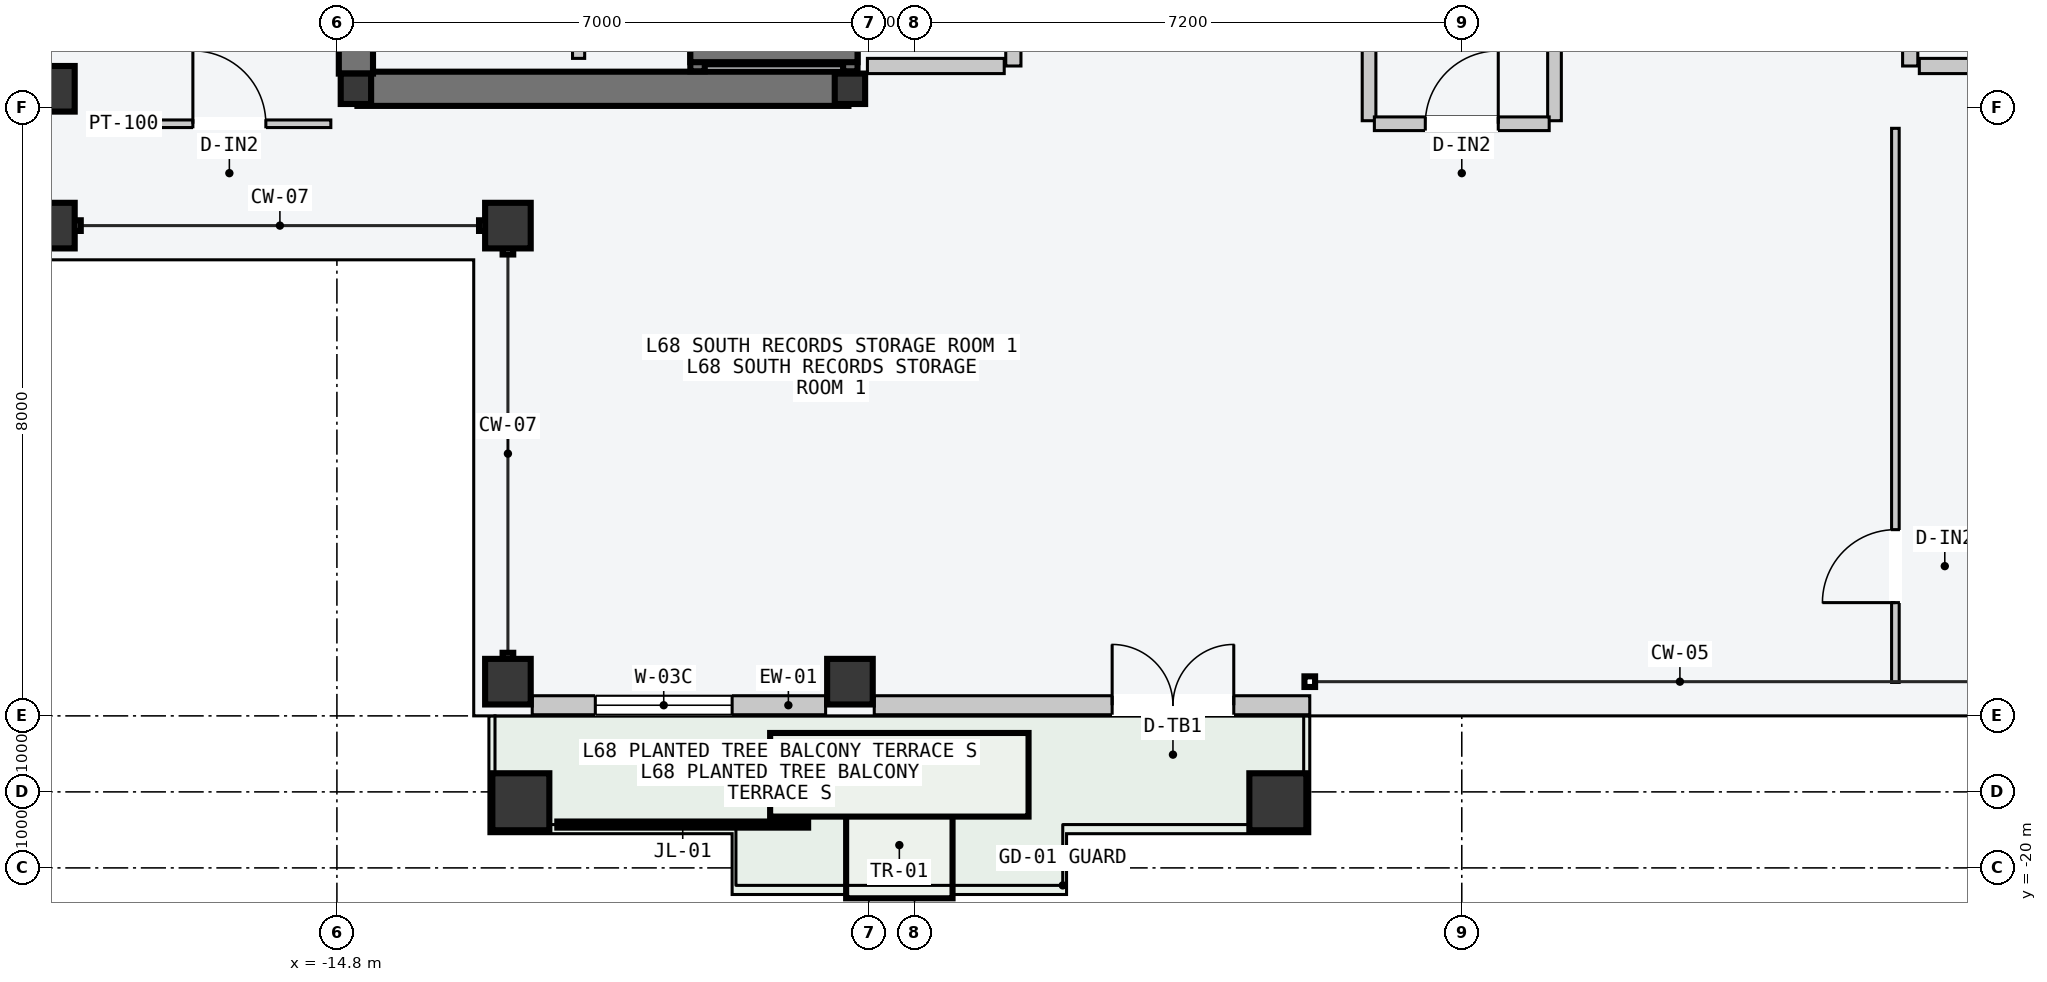
"""IFC4 building model, lengths in metres.
Left out: names, types, materials, properties, quantities, classifications, styles, units other than length and angle.
Written with IfcOpenShell. Run it as: python <this file> out.ifc"""

import sys

from ifc_helpers import new_model, si_unit, direction, frame, frame_2d, origin, origin_2d, place, context, subcontext, project, spatial, rectangle, hollow_rectangle, i_section, extrude, element, fill, save


model = new_model("IFC4")
c1 = context("Model", 3, precision=1e-05, world=origin(), true_north=direction((0.0, 1.0)))
c2 = subcontext(c1, "Body", "Model", "MODEL_VIEW")
j1 = project(units=[si_unit("LENGTHUNIT", "METRE"), si_unit("PLANEANGLEUNIT", "RADIAN")], contexts=[c1])
p1 = place(None, origin())
s1 = spatial("IfcSite", under=j1, at=p1, CompositionType="ELEMENT")
p2 = place(p1, origin())
s2 = spatial("IfcBuilding", under=s1, at=p2, CompositionType="ELEMENT")
p3 = place(p2, frame((0.0, 0.0, 258.0)))
s3 = spatial("IfcBuildingStorey", under=s2, at=p3, CompositionType="ELEMENT", Elevation=258.0)
p4 = place(p3, frame((-14.53, -9.75, -0.2), z_axis=(0.0, 0.0, 1.0), x_axis=(1.0, 0.0, 0.0)))
e1 = element("IfcWall", 1, at=p4, inside=s3, PredefinedType="SHEAR", context=c2, shape_type="SweptSolid", body=[
    extrude(rectangle(XDim=6.46, YDim=0.45, at=frame_2d((3.23, 0.0))), origin(), (0.0, 0.0, 1.0), 3.6),
])
p5 = place(p3, frame((-14.55, -9.55, -0.2), z_axis=(0.0, 0.0, 1.0), x_axis=(0.0, 1.0, 0.0)))
e2 = element("IfcWall", 2, at=p5, inside=s3, PredefinedType="SHEAR", context=c2, shape_type="SweptSolid", body=[
    extrude(rectangle(XDim=9.35, YDim=0.45, at=frame_2d((4.675, 0.0))), origin(), (0.0, 0.0, 1.0), 3.6),
])
for number, where, z_axis, x_axis in (
    (3, (-14.55, -9.75, 0.0), (0.0, 0.0, 1.0), (1.0, 0.0, 0.0)),
    (4, (-8.05, -9.75, 0.0), (0.0, 0.0, 1.0), (1.0, 0.0, 0.0)),
):
    element("IfcColumn", number, at=place(p3, frame(where, z_axis=z_axis, x_axis=x_axis)), inside=s3, PredefinedType="COLUMN", context=c2, shape_type="SweptSolid", body=[
        extrude(i_section(OverallWidth=0.4, OverallDepth=0.4, WebThickness=0.013, FlangeThickness=0.021, at=origin_2d()), origin(), (0.0, 0.0, 1.0), 3.6),
    ])
for number, where, z_axis, x_axis in (
    (5, (-12.55, -17.55, 0.0), (0.0, 0.0, 1.0), (1.0, 0.0, 0.0)),
    (6, (-8.05, -17.55, 0.0), (0.0, 0.0, 1.0), (1.0, 0.0, 0.0)),
    (7, (-18.55, -11.55, 0.0), (0.0, 0.0, 1.0), (0.0, 1.0, 0.0)),
    (8, (-18.55, -9.75, 0.0), (0.0, 0.0, 1.0), (0.0, 1.0, 0.0)),
    (9, (-12.55, -11.55, 0.0), (0.0, 0.0, 1.0), (1.0, 0.0, 0.0)),
):
    element("IfcColumn", number, at=place(p3, frame(where, z_axis=z_axis, x_axis=x_axis)), inside=s3, PredefinedType="COLUMN", context=c2, shape_type="SweptSolid", body=[
        extrude(hollow_rectangle(XDim=0.6, YDim=0.6, WallThickness=0.025, at=origin_2d()), origin(), (0.0, 0.0, 1.0), 3.6),
    ])
for number, where, z_axis, x_axis in (
    (10, (-12.38, -19.13, 0.0), (0.0, 0.0, 1.0), (1.0, 0.0, 0.0)),
    (11, (-2.42, -19.13, 0.0), (0.0, 0.0, 1.0), (1.0, 0.0, 0.0)),
):
    element("IfcColumn", number, at=place(p3, frame(where, z_axis=z_axis, x_axis=x_axis)), inside=s3, PredefinedType="COLUMN", context=c2, shape_type="SweptSolid", body=[
        extrude(hollow_rectangle(XDim=0.75, YDim=0.75, WallThickness=0.032, at=origin_2d()), origin(), (0.0, 0.0, 1.0), 3.6),
    ])
p6 = place(p3, frame((-12.23, -17.86, 0.0), z_axis=(0.0, 0.0, 1.0), x_axis=(1.0, 0.0, 0.0)))
e12 = element("IfcWall", 12, at=p6, inside=s3, PredefinedType="STANDARD", context=c2, shape_type="SweptSolid", body=[
    extrude(rectangle(XDim=3.86, YDim=0.25, at=frame_2d((1.93, 0.0))), origin(), (0.0, 0.0, 1.0), 3.4),
])
p7 = place(p6, frame((0.83, 0.0, 0.85)))
e13 = element("IfcOpeningElement", 13, at=p7, cuts=e12, PredefinedType="OPENING", context=c2, shape_type="SweptSolid", body=[
    extrude(rectangle(XDim=1.8, YDim=2.05, at=frame_2d((0.9, 1.025))), frame((0.0, 0.135, 0.0), z_axis=(0.0, -1.0, 0.0), x_axis=(1.0, 0.0, 0.0)), (0.0, 0.0, 1.0), 0.27),
])
p8 = place(p3, frame((-7.73, -17.86, 0.0), z_axis=(0.0, 0.0, 1.0), x_axis=(1.0, 0.0, 0.0)))
e14 = element("IfcWall", 14, at=p8, inside=s3, PredefinedType="STANDARD", context=c2, shape_type="SweptSolid", body=[
    extrude(rectangle(XDim=5.73, YDim=0.25, at=frame_2d((2.865, 0.0))), origin(), (0.0, 0.0, 1.0), 3.4),
])
p9 = place(p8, frame((3.13, 0.0, 0.0)))
e15 = element("IfcOpeningElement", 15, at=p9, cuts=e14, PredefinedType="OPENING", context=c2, shape_type="SweptSolid", body=[
    extrude(rectangle(XDim=1.6, YDim=2.2, at=frame_2d((0.8, 1.1))), frame((0.0, 0.135, 0.0), z_axis=(0.0, -1.0, 0.0), x_axis=(1.0, 0.0, 0.0)), (0.0, 0.0, 1.0), 0.27),
])
p10 = place(p3, frame((-8.045, -9.52, -0.2), z_axis=(0.0, 0.0, 1.0), x_axis=(0.0, 1.0, 0.0)))
e16 = element("IfcWall", 16, at=p10, inside=s3, PredefinedType="SOLIDWALL", context=c2, shape_type="SweptSolid", body=[
    extrude(rectangle(XDim=2.12, YDim=0.19, at=frame_2d((1.06, 0.0))), origin(), (0.0, 0.0, 1.0), 3.6),
])
p11 = place(p10, frame((0.57, 0.0, 0.2)))
e17 = element("IfcOpeningElement", 17, at=p11, cuts=e16, PredefinedType="OPENING", context=c2, shape_type="SweptSolid", body=[
    extrude(rectangle(XDim=1.1, YDim=2.2, at=frame_2d((0.55, 1.1))), frame((0.0, 0.105, 0.0), z_axis=(0.0, -1.0, 0.0), x_axis=(1.0, 0.0, 0.0)), (0.0, 0.0, 1.0), 0.21),
])
p12 = place(p3, frame((-10.055, -9.52, -0.2), z_axis=(0.0, 0.0, 1.0), x_axis=(0.0, 1.0, 0.0)))
e18 = element("IfcWall", 18, at=p12, inside=s3, PredefinedType="SOLIDWALL", context=c2, shape_type="SweptSolid", body=[
    extrude(rectangle(XDim=2.12, YDim=0.19, at=frame_2d((1.06, 0.0))), origin(), (0.0, 0.0, 1.0), 3.6),
])
p13 = place(p3, frame((-10.15, -9.305, -0.2), z_axis=(0.0, 0.0, 1.0), x_axis=(1.0, 0.0, 0.0)))
e19 = element("IfcWall", 19, at=p13, inside=s3, PredefinedType="SOLIDWALL", context=c2, shape_type="SweptSolid", body=[
    extrude(rectangle(XDim=2.2, YDim=0.19, at=frame_2d((1.1, 0.0))), origin(), (0.0, 0.0, 1.0), 3.6),
])
p14 = place(p3, frame((-5.9, -9.45, 0.0), z_axis=(0.0, 0.0, 1.0), x_axis=(0.0, 1.0, 0.0)))
e20 = element("IfcWall", 20, at=p14, inside=s3, PredefinedType="PARTITIONING", context=c2, shape_type="SweptSolid", body=[
    extrude(rectangle(XDim=10.5, YDim=0.2, at=frame_2d((5.25, 0.0))), origin(), (0.0, 0.0, 1.0), 3.4),
])
p15 = place(p14, frame((3.9, 0.0, 0.0)))
e21 = element("IfcOpeningElement", 21, at=p15, cuts=e20, PredefinedType="OPENING", context=c2, shape_type="SweptSolid", body=[
    extrude(rectangle(XDim=1.5, YDim=2.2, at=frame_2d((0.75, 1.1))), frame((0.0, 0.11, 0.0), z_axis=(0.0, -1.0, 0.0), x_axis=(1.0, 0.0, 0.0)), (0.0, 0.0, 1.0), 0.22),
])
p16 = place(p3, frame((-6.02, -9.45, 0.0), z_axis=(0.0, 0.0, 1.0), x_axis=(-1.0, 0.0, 0.0)))
e22 = element("IfcWall", 22, at=p16, inside=s3, PredefinedType="PARTITIONING", context=c2, shape_type="SweptSolid", body=[
    extrude(rectangle(XDim=1.8, YDim=0.2, at=frame_2d((0.9, 0.0))), origin(), (0.0, 0.0, 1.0), 3.4),
])
p17 = place(p3, frame((-11.62, -9.35, 0.0), z_axis=(0.0, 0.0, 1.0), x_axis=(0.0, 1.0, 0.0)))
e23 = element("IfcWall", 23, at=p17, inside=s3, PredefinedType="PARTITIONING", context=c2, shape_type="SweptSolid", body=[
    extrude(rectangle(XDim=3.85, YDim=0.16, at=frame_2d((1.925, 0.0))), origin(), (0.0, 0.0, 1.0), 3.4),
])
p18 = place(p17, frame((0.512, 0.0, 0.0)))
e24 = element("IfcOpeningElement", 24, at=p18, cuts=e23, PredefinedType="OPENING", context=c2, shape_type="SweptSolid", body=[
    extrude(rectangle(XDim=0.9, YDim=2.15, at=frame_2d((0.45, 1.075))), frame((0.0, 0.09, 0.0), z_axis=(0.0, -1.0, 0.0), x_axis=(1.0, 0.0, 0.0)), (0.0, 0.0, 1.0), 0.18),
])
p19 = place(p17, frame((2.438, 0.0, 0.0)))
e25 = element("IfcOpeningElement", 25, at=p19, cuts=e23, PredefinedType="OPENING", context=c2, shape_type="SweptSolid", body=[
    extrude(rectangle(XDim=0.9, YDim=2.15, at=frame_2d((0.45, 1.075))), frame((0.0, 0.09, 0.0), z_axis=(0.0, -1.0, 0.0), x_axis=(1.0, 0.0, 0.0)), (0.0, 0.0, 1.0), 0.18),
])
p20 = place(p3, frame((5.9, -9.45, 0.0), z_axis=(0.0, 0.0, 1.0), x_axis=(0.0, 1.0, 0.0)))
e26 = element("IfcWall", 26, at=p20, inside=s3, PredefinedType="PARTITIONING", context=c2, shape_type="SweptSolid", body=[
    extrude(rectangle(XDim=10.5, YDim=0.2, at=frame_2d((5.25, 0.0))), origin(), (0.0, 0.0, 1.0), 3.4),
])
p21 = place(p20, frame((3.9, 0.0, 0.0)))
e27 = element("IfcOpeningElement", 27, at=p21, cuts=e26, PredefinedType="OPENING", context=c2, shape_type="SweptSolid", body=[
    extrude(rectangle(XDim=1.5, YDim=2.2, at=frame_2d((0.75, 1.1))), frame((0.0, 0.11, 0.0), z_axis=(0.0, -1.0, 0.0), x_axis=(1.0, 0.0, 0.0)), (0.0, 0.0, 1.0), 0.22),
])
p22 = place(p3, frame((6.02, -9.45, 0.0), z_axis=(0.0, 0.0, 1.0), x_axis=(1.0, 0.0, 0.0)))
e28 = element("IfcWall", 28, at=p22, inside=s3, PredefinedType="PARTITIONING", context=c2, shape_type="SweptSolid", body=[
    extrude(rectangle(XDim=1.8, YDim=0.2, at=frame_2d((0.9, 0.0))), origin(), (0.0, 0.0, 1.0), 3.4),
])
p23 = place(p3, frame((-1.22, -10.17, 0.0), z_axis=(0.0, 0.0, 1.0), x_axis=(0.0, 1.0, 0.0)))
e29 = element("IfcWall", 29, at=p23, inside=s3, PredefinedType="PARTITIONING", context=c2, shape_type="SweptSolid", body=[
    extrude(rectangle(XDim=4.49, YDim=0.18, at=frame_2d((2.245, 0.0))), origin(), (0.0, 0.0, 1.0), 3.4),
])
p24 = place(p23, frame((1.15, 0.0, 0.0)))
e30 = element("IfcOpeningElement", 30, at=p24, cuts=e29, PredefinedType="OPENING", context=c2, shape_type="SweptSolid", body=[
    extrude(rectangle(XDim=0.96, YDim=2.18, at=frame_2d((0.48, 1.09))), frame((0.0, 0.1, 0.0), z_axis=(0.0, -1.0, 0.0), x_axis=(1.0, 0.0, 0.0)), (0.0, 0.0, 1.0), 0.2),
])
p25 = place(p3, frame((1.22, -10.17, 0.0), z_axis=(0.0, 0.0, 1.0), x_axis=(0.0, 1.0, 0.0)))
e31 = element("IfcWall", 31, at=p25, inside=s3, PredefinedType="PARTITIONING", context=c2, shape_type="SweptSolid", body=[
    extrude(rectangle(XDim=4.49, YDim=0.18, at=frame_2d((2.245, 0.0))), origin(), (0.0, 0.0, 1.0), 3.4),
])
p26 = place(p25, frame((1.15, 0.0, 0.0)))
e32 = element("IfcOpeningElement", 32, at=p26, cuts=e31, PredefinedType="OPENING", context=c2, shape_type="SweptSolid", body=[
    extrude(rectangle(XDim=0.96, YDim=2.18, at=frame_2d((0.48, 1.09))), frame((0.0, 0.1, 0.0), z_axis=(0.0, -1.0, 0.0), x_axis=(1.0, 0.0, 0.0)), (0.0, 0.0, 1.0), 0.2),
])
p27 = place(p3, frame((5.705, -17.56, 0.0), z_axis=(0.0, 0.0, 1.0), x_axis=(0.0, 1.0, 0.0)))
e33 = element("IfcWall", 33, at=p27, inside=s3, PredefinedType="PARTITIONING", context=c2, shape_type="SweptSolid", body=[
    extrude(rectangle(XDim=7.29, YDim=0.1, at=frame_2d((3.645, 0.0))), origin(), (0.0, 0.0, 1.0), 3.4),
])
p28 = place(p27, frame((1.05, 0.0, 0.0)))
e34 = element("IfcOpeningElement", 34, at=p28, cuts=e33, PredefinedType="OPENING", context=c2, shape_type="SweptSolid", body=[
    extrude(rectangle(XDim=0.96, YDim=2.18, at=frame_2d((0.48, 1.09))), frame((0.0, 0.06, 0.0), z_axis=(0.0, -1.0, 0.0), x_axis=(1.0, 0.0, 0.0)), (0.0, 0.0, 1.0), 0.12),
])
p29 = place(p3, frame((-1.15, -10.21, 0.0), z_axis=(0.0, 0.0, 1.0), x_axis=(1.0, 0.0, 0.0)))
e35 = element("IfcWall", 35, at=p29, inside=s3, PredefinedType="PARTITIONING", context=c2, shape_type="SweptSolid", body=[
    extrude(rectangle(XDim=2.3, YDim=0.18, at=frame_2d((1.15, 0.0))), origin(), (0.0, 0.0, 1.0), 3.4),
])
p30 = place(p29, frame((0.67, 0.0, 0.0)))
e36 = element("IfcOpeningElement", 36, at=p30, cuts=e35, PredefinedType="OPENING", context=c2, shape_type="SweptSolid", body=[
    extrude(rectangle(XDim=0.96, YDim=2.18, at=frame_2d((0.48, 1.09))), frame((0.0, 0.1, 0.0), z_axis=(0.0, -1.0, 0.0), x_axis=(1.0, 0.0, 0.0)), (0.0, 0.0, 1.0), 0.2),
])
p31 = place(p3, frame((-17.55, -10.21, 0.0), z_axis=(0.0, 0.0, 1.0), x_axis=(1.0, 0.0, 0.0)))
e37 = element("IfcWall", 37, at=p31, inside=s3, PredefinedType="PARTITIONING", context=c2, shape_type="SweptSolid", body=[
    extrude(rectangle(XDim=2.67, YDim=0.1, at=frame_2d((1.335, 0.0))), origin(), (0.0, 0.0, 1.0), 3.4),
])
p32 = place(p31, frame((0.855, 0.0, 0.0)))
e38 = element("IfcOpeningElement", 38, at=p32, cuts=e37, PredefinedType="OPENING", context=c2, shape_type="SweptSolid", body=[
    extrude(rectangle(XDim=0.96, YDim=2.18, at=frame_2d((0.48, 1.09))), frame((0.0, 0.06, 0.0), z_axis=(0.0, -1.0, 0.0), x_axis=(1.0, 0.0, 0.0)), (0.0, 0.0, 1.0), 0.12),
])
p33 = place(p7, origin())
e39 = element("IfcWindow", 39, at=p33, inside=s3, PartitioningType="SINGLE_PANEL", PredefinedType="WINDOW", context=c2, shape_type="SweptSolid", body=[
    extrude(rectangle(XDim=1.8, YDim=2.05, at=frame_2d((0.9, 1.025))), frame((0.0, 0.03, 0.0), z_axis=(0.0, -1.0, 0.0), x_axis=(1.0, 0.0, 0.0)), (0.0, 0.0, 1.0), 0.06),
])
fill(e13, e39)
p34 = place(p9, origin())
e40 = element("IfcDoor", 40, at=p34, inside=s3, OperationType="DOUBLE_DOOR_SINGLE_SWING", PredefinedType="DOOR", context=c2, shape_type="SweptSolid", body=[
    extrude(rectangle(XDim=1.6, YDim=2.2, at=frame_2d((0.8, 1.1))), frame((0.0, 0.025, 0.0), z_axis=(0.0, -1.0, 0.0), x_axis=(1.0, 0.0, 0.0)), (0.0, 0.0, 1.0), 0.05),
])
fill(e15, e40)
p35 = place(p28, origin())
e41 = element("IfcDoor", 41, at=p35, inside=s3, OperationType="SINGLE_SWING_LEFT", PredefinedType="DOOR", context=c2, shape_type="SweptSolid", body=[
    extrude(rectangle(XDim=0.96, YDim=2.18, at=frame_2d((0.48, 1.09))), frame((0.0, 0.025, 0.0), z_axis=(0.0, -1.0, 0.0), x_axis=(1.0, 0.0, 0.0)), (0.0, 0.0, 1.0), 0.05),
])
fill(e34, e41)
p36 = place(p30, origin())
e42 = element("IfcDoor", 42, at=p36, inside=s3, OperationType="SINGLE_SWING_RIGHT", PredefinedType="DOOR", context=c2, shape_type="SweptSolid", body=[
    extrude(rectangle(XDim=0.96, YDim=2.18, at=frame_2d((0.48, 1.09))), frame((0.0, 0.025, 0.0), z_axis=(0.0, -1.0, 0.0), x_axis=(1.0, 0.0, 0.0)), (0.0, 0.0, 1.0), 0.05),
])
fill(e36, e42)
p37 = place(p32, origin())
e43 = element("IfcDoor", 43, at=p37, inside=s3, OperationType="SINGLE_SWING_LEFT", PredefinedType="DOOR", context=c2, shape_type="SweptSolid", body=[
    extrude(rectangle(XDim=0.96, YDim=2.18, at=frame_2d((0.48, 1.09))), frame((0.0, 0.025, 0.0), z_axis=(0.0, -1.0, 0.0), x_axis=(1.0, 0.0, 0.0)), (0.0, 0.0, 1.0), 0.05),
])
fill(e38, e43)
save(model, sys.argv[1])
